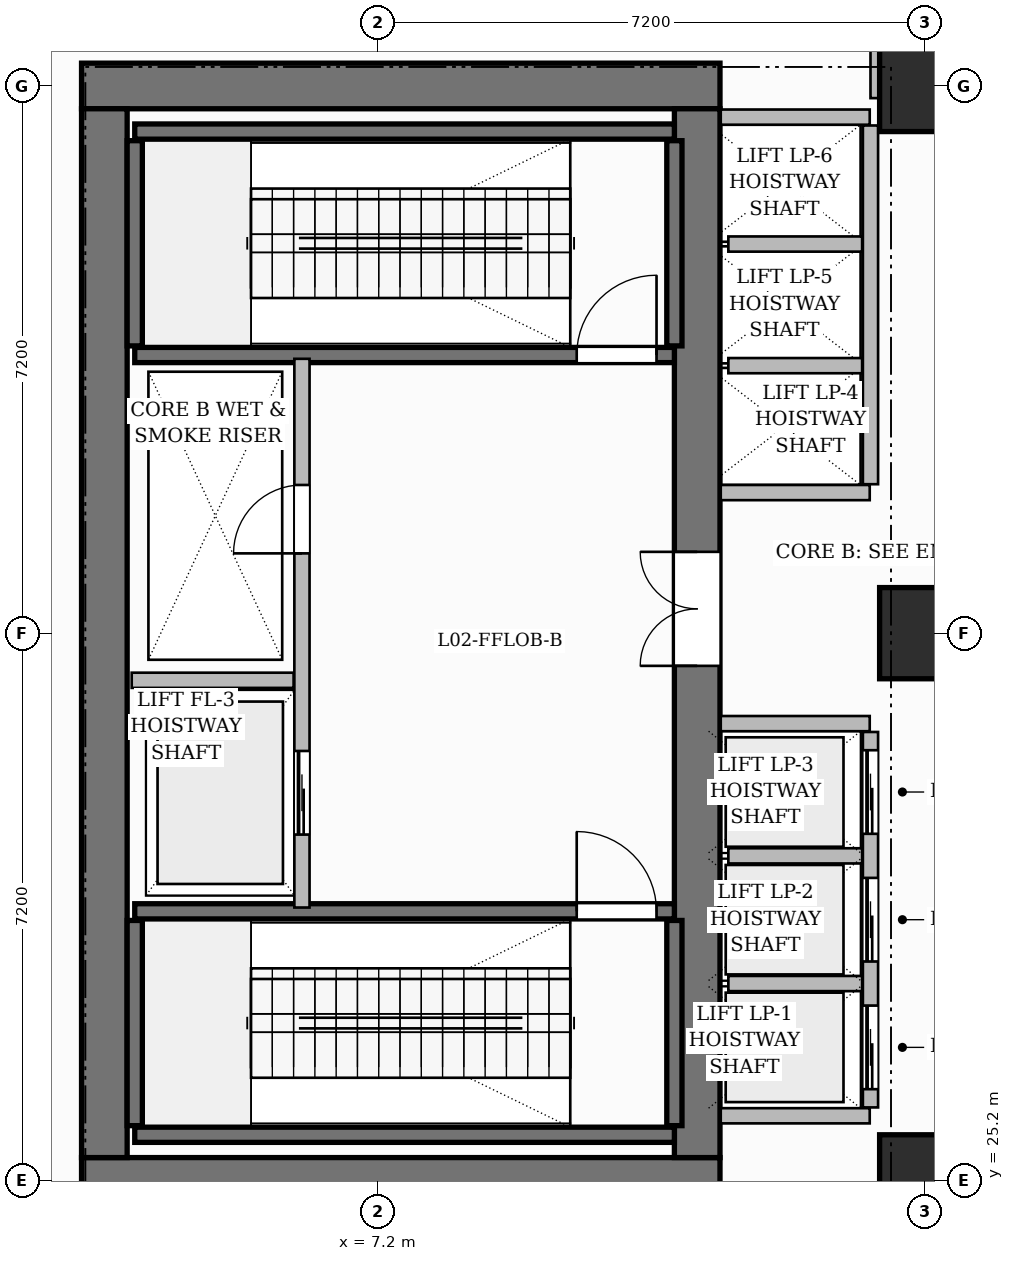
"""IFC4 building model, lengths in metres.
Left out: names, types, materials, properties, quantities, classifications, styles, units other than length and angle.
Written with IfcOpenShell. Run it as: python <this file> out.ifc"""

import sys

from ifc_helpers import new_model, si_unit, direction, frame, frame_2d, origin, origin_2d, place, context, subcontext, project, spatial, rectangle, extrude, source, transform, mapped, element, fill, save


model = new_model("IFC4")
c1 = context("Model", 3, precision=1e-05, world=origin(), true_north=direction((0.0, 1.0)))
c2 = subcontext(c1, "Body", "Model", "MODEL_VIEW")
j1 = project(units=[si_unit("LENGTHUNIT", "METRE"), si_unit("PLANEANGLEUNIT", "RADIAN")], contexts=[c1])
p1 = place(None, origin())
s1 = spatial("IfcSite", under=j1, at=p1, CompositionType="ELEMENT")
p2 = place(p1, origin())
s2 = spatial("IfcBuilding", under=s1, at=p2, CompositionType="ELEMENT")
p3 = place(p2, frame((0.0, 0.0, 10.8)))
s3 = spatial("IfcBuildingStorey", under=s2, at=p3, CompositionType="ELEMENT", Elevation=10.8)
for number, where, z_axis, x_axis in (
    (1, (3.3, 25.2, 0.0), (0.0, 0.0, 1.0), (1.0, 0.0, 0.0)),
    (2, (3.3, 39.6, 0.0), (0.0, 0.0, 1.0), (1.0, 0.0, 0.0)),
):
    element("IfcWall", number, at=place(p3, frame(where, z_axis=z_axis, x_axis=x_axis)), inside=s3, PredefinedType="SHEAR", context=c2, shape_type="SweptSolid", body=[
        extrude(rectangle(XDim=8.4, YDim=0.6, at=frame_2d((4.2, 0.0))), origin(), (0.0, 0.0, 1.0), 5.4),
    ])
p4 = place(p3, frame((3.6, 25.5, 0.0), z_axis=(0.0, 0.0, 1.0), x_axis=(0.0, 1.0, 0.0)))
e3 = element("IfcWall", 3, at=p4, inside=s3, PredefinedType="SHEAR", context=c2, shape_type="SweptSolid", body=[
    extrude(rectangle(XDim=13.8, YDim=0.6, at=frame_2d((6.9, 0.0))), origin(), (0.0, 0.0, 1.0), 5.4),
])
p5 = place(p3, frame((11.4, 25.5, 0.0), z_axis=(0.0, 0.0, 1.0), x_axis=(0.0, 1.0, 0.0)))
e4 = element("IfcWall", 4, at=p5, inside=s3, PredefinedType="SHEAR", context=c2, shape_type="SweptSolid", body=[
    extrude(rectangle(XDim=13.8, YDim=0.6, at=frame_2d((6.9, 0.0))), origin(), (0.0, 0.0, 1.0), 5.4),
])
p6 = place(p5, frame((6.47, 0.0, 0.0)))
e5 = element("IfcOpeningElement", 5, at=p6, cuts=e4, PredefinedType="OPENING", context=c2, shape_type="SweptSolid", body=[
    extrude(rectangle(XDim=1.5, YDim=2.2, at=frame_2d((0.75, 1.1))), frame((0.0, 0.31, 0.0), z_axis=(0.0, -1.0, 0.0), x_axis=(1.0, 0.0, 0.0)), (0.0, 0.0, 1.0), 0.62),
])
m1 = source(origin(), c2, "Body", "SweptSolid", [
    extrude(rectangle(XDim=1.2, YDim=1.2, at=origin_2d()), origin(), (0.0, 0.0, 1.0), 5.4),
])
for number, where, z_axis, x_axis in (
    (6, (14.4, 25.2, 0.0), (0.0, 0.0, 1.0), (1.0, 0.0, 0.0)),
    (7, (14.4, 32.4, 0.0), (0.0, 0.0, 1.0), (1.0, 0.0, 0.0)),
    (8, (14.4, 39.6, 0.0), (0.0, 0.0, 1.0), (1.0, 0.0, 0.0)),
):
    element("IfcColumn", number, at=place(p3, frame(where, z_axis=z_axis, x_axis=x_axis)), inside=s3, PredefinedType="COLUMN", context=c2, shape_type="MappedRepresentation", body=[
        mapped(m1, transform((0.0, 0.0, 0.0), scale=1.0)),
    ])
p7 = place(p3, frame((4.0, 25.8, 0.0), z_axis=(0.0, 0.0, 1.0), x_axis=(1.0, 0.0, 0.0)))
e9 = element("IfcWall", 9, at=p7, inside=s3, PredefinedType="SHEAR", context=c2, shape_type="SweptSolid", body=[
    extrude(rectangle(XDim=7.1, YDim=0.2, at=frame_2d((3.55, 0.0))), origin(), (0.0, 0.0, 1.0), 5.4),
])
for number, where, z_axis, x_axis in (
    (10, (4.0, 25.92, 0.0), (0.0, 0.0, 1.0), (0.0, 1.0, 0.0)),
    (11, (11.1, 25.92, 0.0), (0.0, 0.0, 1.0), (0.0, 1.0, 0.0)),
):
    element("IfcWall", number, at=place(p3, frame(where, z_axis=z_axis, x_axis=x_axis)), inside=s3, PredefinedType="SHEAR", context=c2, shape_type="SweptSolid", body=[
        extrude(rectangle(XDim=2.7, YDim=0.2, at=frame_2d((1.35, 0.0))), origin(), (0.0, 0.0, 1.0), 5.4),
    ])
p8 = place(p3, frame((4.0, 28.74, 0.0), z_axis=(0.0, 0.0, 1.0), x_axis=(1.0, 0.0, 0.0)))
e12 = element("IfcWall", 12, at=p8, inside=s3, PredefinedType="SHEAR", context=c2, shape_type="SweptSolid", body=[
    extrude(rectangle(XDim=7.1, YDim=0.2, at=frame_2d((3.55, 0.0))), origin(), (0.0, 0.0, 1.0), 5.4),
])
p9 = place(p8, frame((5.815, 0.0, 0.0)))
e13 = element("IfcOpeningElement", 13, at=p9, cuts=e12, PredefinedType="OPENING", context=c2, shape_type="SweptSolid", body=[
    extrude(rectangle(XDim=1.05, YDim=2.2, at=frame_2d((0.525, 1.1))), frame((0.0, 0.11, 0.0), z_axis=(0.0, -1.0, 0.0), x_axis=(1.0, 0.0, 0.0)), (0.0, 0.0, 1.0), 0.22),
])
p10 = place(p3, frame((4.0, 39.0, 0.0), z_axis=(0.0, 0.0, 1.0), x_axis=(1.0, 0.0, 0.0)))
e14 = element("IfcWall", 14, at=p10, inside=s3, PredefinedType="SHEAR", context=c2, shape_type="SweptSolid", body=[
    extrude(rectangle(XDim=7.1, YDim=0.2, at=frame_2d((3.55, 0.0))), origin(), (0.0, 0.0, 1.0), 5.4),
])
for number, where, z_axis, x_axis in (
    (15, (4.0, 36.18, 0.0), (0.0, 0.0, 1.0), (0.0, 1.0, 0.0)),
    (16, (11.1, 36.18, 0.0), (0.0, 0.0, 1.0), (0.0, 1.0, 0.0)),
):
    element("IfcWall", number, at=place(p3, frame(where, z_axis=z_axis, x_axis=x_axis)), inside=s3, PredefinedType="SHEAR", context=c2, shape_type="SweptSolid", body=[
        extrude(rectangle(XDim=2.7, YDim=0.2, at=frame_2d((1.35, 0.0))), origin(), (0.0, 0.0, 1.0), 5.4),
    ])
p11 = place(p3, frame((4.0, 36.06, 0.0), z_axis=(0.0, 0.0, 1.0), x_axis=(1.0, 0.0, 0.0)))
e17 = element("IfcWall", 17, at=p11, inside=s3, PredefinedType="SHEAR", context=c2, shape_type="SweptSolid", body=[
    extrude(rectangle(XDim=7.1, YDim=0.2, at=frame_2d((3.55, 0.0))), origin(), (0.0, 0.0, 1.0), 5.4),
])
p12 = place(p11, frame((5.815, 0.0, 0.0)))
e18 = element("IfcOpeningElement", 18, at=p12, cuts=e17, PredefinedType="OPENING", context=c2, shape_type="SweptSolid", body=[
    extrude(rectangle(XDim=1.05, YDim=2.2, at=frame_2d((0.525, 1.1))), frame((0.0, 0.11, 0.0), z_axis=(0.0, -1.0, 0.0), x_axis=(1.0, 0.0, 0.0)), (0.0, 0.0, 1.0), 0.22),
])
p13 = place(p3, frame((6.2, 28.79, 0.0), z_axis=(0.0, 0.0, 1.0), x_axis=(0.0, 1.0, 0.0)))
e19 = element("IfcWall", 19, at=p13, inside=s3, PredefinedType="PARTITIONING", context=c2, shape_type="SweptSolid", body=[
    extrude(rectangle(XDim=7.22, YDim=0.2, at=frame_2d((3.61, 0.0))), origin(), (0.0, 0.0, 1.0), 5.1),
])
p14 = place(p13, frame((4.66, 0.0, 0.0)))
e20 = element("IfcOpeningElement", 20, at=p14, cuts=e19, PredefinedType="OPENING", context=c2, shape_type="SweptSolid", body=[
    extrude(rectangle(XDim=0.9, YDim=2.1, at=frame_2d((0.45, 1.05))), frame((0.0, 0.11, 0.0), z_axis=(0.0, -1.0, 0.0), x_axis=(1.0, 0.0, 0.0)), (0.0, 0.0, 1.0), 0.22),
])
p15 = place(p13, frame((0.96, 0.0, 0.0)))
e21 = element("IfcOpeningElement", 21, at=p15, cuts=e19, PredefinedType="OPENING", context=c2, shape_type="SweptSolid", body=[
    extrude(rectangle(XDim=1.1, YDim=2.2, at=frame_2d((0.55, 1.1))), frame((0.0, 0.11, 0.0), z_axis=(0.0, -1.0, 0.0), x_axis=(1.0, 0.0, 0.0)), (0.0, 0.0, 1.0), 0.22),
])
p16 = place(p3, frame((3.96, 31.78, 0.0), z_axis=(0.0, 0.0, 1.0), x_axis=(1.0, 0.0, 0.0)))
e22 = element("IfcWall", 22, at=p16, inside=s3, PredefinedType="PARTITIONING", context=c2, shape_type="SweptSolid", body=[
    extrude(rectangle(XDim=2.13, YDim=0.2, at=frame_2d((1.065, 0.0))), origin(), (0.0, 0.0, 1.0), 5.1),
])
for number, where, z_axis, x_axis in (
    (23, (11.71, 26.05, 0.0), (0.0, 0.0, 1.0), (1.0, 0.0, 0.0)),
    (24, (11.71, 31.21, 0.0), (0.0, 0.0, 1.0), (1.0, 0.0, 0.0)),
):
    element("IfcWall", number, at=place(p3, frame(where, z_axis=z_axis, x_axis=x_axis)), inside=s3, PredefinedType="PARTITIONING", context=c2, shape_type="SweptSolid", body=[
        extrude(rectangle(XDim=1.96, YDim=0.2, at=frame_2d((0.98, 0.0))), origin(), (0.0, 0.0, 1.0), 5.1),
    ])
p17 = place(p3, frame((13.68, 26.16, 0.0), z_axis=(0.0, 0.0, 1.0), x_axis=(0.0, 1.0, 0.0)))
e25 = element("IfcWall", 25, at=p17, inside=s3, PredefinedType="PARTITIONING", context=c2, shape_type="SweptSolid", body=[
    extrude(rectangle(XDim=4.94, YDim=0.2, at=frame_2d((2.47, 0.0))), origin(), (0.0, 0.0, 1.0), 5.1),
])
p18 = place(p17, frame((0.24, 0.0, 0.0)))
e26 = element("IfcOpeningElement", 26, at=p18, cuts=e25, PredefinedType="OPENING", context=c2, shape_type="SweptSolid", body=[
    extrude(rectangle(XDim=1.1, YDim=2.2, at=frame_2d((0.55, 1.1))), frame((0.0, 0.11, 0.0), z_axis=(0.0, -1.0, 0.0), x_axis=(1.0, 0.0, 0.0)), (0.0, 0.0, 1.0), 0.22),
])
p19 = place(p17, frame((1.92, 0.0, 0.0)))
e27 = element("IfcOpeningElement", 27, at=p19, cuts=e25, PredefinedType="OPENING", context=c2, shape_type="SweptSolid", body=[
    extrude(rectangle(XDim=1.1, YDim=2.2, at=frame_2d((0.55, 1.1))), frame((0.0, 0.11, 0.0), z_axis=(0.0, -1.0, 0.0), x_axis=(1.0, 0.0, 0.0)), (0.0, 0.0, 1.0), 0.22),
])
p20 = place(p17, frame((3.6, 0.0, 0.0)))
e28 = element("IfcOpeningElement", 28, at=p20, cuts=e25, PredefinedType="OPENING", context=c2, shape_type="SweptSolid", body=[
    extrude(rectangle(XDim=1.1, YDim=2.2, at=frame_2d((0.55, 1.1))), frame((0.0, 0.11, 0.0), z_axis=(0.0, -1.0, 0.0), x_axis=(1.0, 0.0, 0.0)), (0.0, 0.0, 1.0), 0.22),
])
for number, where, z_axis, x_axis in (
    (29, (11.81, 27.79, 0.0), (0.0, 0.0, 1.0), (1.0, 0.0, 0.0)),
    (30, (11.81, 29.47, 0.0), (0.0, 0.0, 1.0), (1.0, 0.0, 0.0)),
):
    element("IfcWall", number, at=place(p3, frame(where, z_axis=z_axis, x_axis=x_axis)), inside=s3, PredefinedType="PARTITIONING", context=c2, shape_type="SweptSolid", body=[
        extrude(rectangle(XDim=1.76, YDim=0.2, at=frame_2d((0.88, 0.0))), origin(), (0.0, 0.0, 1.0), 5.1),
    ])
for number, where, z_axis, x_axis in (
    (31, (11.71, 34.25, 0.0), (0.0, 0.0, 1.0), (1.0, 0.0, 0.0)),
    (32, (11.71, 39.19, 0.0), (0.0, 0.0, 1.0), (1.0, 0.0, 0.0)),
):
    element("IfcWall", number, at=place(p3, frame(where, z_axis=z_axis, x_axis=x_axis)), inside=s3, PredefinedType="PARTITIONING", context=c2, shape_type="SweptSolid", body=[
        extrude(rectangle(XDim=1.96, YDim=0.2, at=frame_2d((0.98, 0.0))), origin(), (0.0, 0.0, 1.0), 5.1),
    ])
p21 = place(p3, frame((13.68, 34.36, 0.0), z_axis=(0.0, 0.0, 1.0), x_axis=(0.0, 1.0, 0.0)))
e33 = element("IfcWall", 33, at=p21, inside=s3, PredefinedType="PARTITIONING", context=c2, shape_type="SweptSolid", body=[
    extrude(rectangle(XDim=4.72, YDim=0.2, at=frame_2d((2.36, 0.0))), origin(), (0.0, 0.0, 1.0), 5.1),
])
for number, where, z_axis, x_axis in (
    (34, (11.81, 35.92, 0.0), (0.0, 0.0, 1.0), (1.0, 0.0, 0.0)),
    (35, (11.81, 37.52, 0.0), (0.0, 0.0, 1.0), (1.0, 0.0, 0.0)),
):
    element("IfcWall", number, at=place(p3, frame(where, z_axis=z_axis, x_axis=x_axis)), inside=s3, PredefinedType="PARTITIONING", context=c2, shape_type="SweptSolid", body=[
        extrude(rectangle(XDim=1.76, YDim=0.2, at=frame_2d((0.88, 0.0))), origin(), (0.0, 0.0, 1.0), 5.1),
    ])
p22 = place(p3, frame((13.75, 39.44, 0.0), z_axis=(0.0, 0.0, 1.0), x_axis=(0.0, 1.0, 0.0)))
e36 = element("IfcWall", 36, at=p22, inside=s3, PredefinedType="PARTITIONING", context=c2, shape_type="SweptSolid", body=[
    extrude(rectangle(XDim=7.192, YDim=0.14, at=frame_2d((3.596, 0.0))), origin(), (0.0, 0.0, 1.0), 5.1),
])
p23 = place(p3, frame((13.84, 39.35, 0.0), z_axis=(0.0, 0.0, 1.0), x_axis=(1.0, 0.0, 0.0)))
e37 = element("IfcWall", 37, at=p23, inside=s3, PredefinedType="PARTITIONING", context=c2, shape_type="SweptSolid", body=[
    extrude(rectangle(XDim=7.92, YDim=0.16, at=frame_2d((3.96, 0.0))), origin(), (0.0, 0.0, 1.0), 4.185),
])
p24 = place(p23, frame((1.22, 0.0, 0.0)))
e38 = element("IfcOpeningElement", 38, at=p24, cuts=e37, PredefinedType="OPENING", context=c2, shape_type="SweptSolid", body=[
    extrude(rectangle(XDim=1.6, YDim=2.4, at=frame_2d((0.8, 1.2))), frame((0.0, 0.09, 0.0), z_axis=(0.0, -1.0, 0.0), x_axis=(1.0, 0.0, 0.0)), (0.0, 0.0, 1.0), 0.18),
])
m2 = source(origin(), c2, "Body", "SweptSolid", [
    extrude(rectangle(XDim=1.05, YDim=2.2, at=frame_2d((0.525, 1.1))), frame((0.0, 0.025, 0.0), z_axis=(0.0, -1.0, 0.0), x_axis=(1.0, 0.0, 0.0)), (0.0, 0.0, 1.0), 0.05),
])
p25 = place(p9, origin())
e39 = element("IfcDoor", 39, at=p25, inside=s3, OperationType="SINGLE_SWING_LEFT", PredefinedType="DOOR", context=c2, shape_type="MappedRepresentation", body=[
    mapped(m2, transform((0.0, 0.0, 0.0), scale=1.0)),
])
fill(e13, e39)
p26 = place(p12, origin())
e40 = element("IfcDoor", 40, at=p26, inside=s3, OperationType="SINGLE_SWING_RIGHT", PredefinedType="DOOR", context=c2, shape_type="MappedRepresentation", body=[
    mapped(m2, transform((0.0, 0.0, 0.0), scale=1.0)),
])
fill(e18, e40)
m3 = source(origin(), c2, "Body", "SweptSolid", [
    extrude(rectangle(XDim=0.9, YDim=2.1, at=frame_2d((0.45, 1.05))), frame((0.0, 0.025, 0.0), z_axis=(0.0, -1.0, 0.0), x_axis=(1.0, 0.0, 0.0)), (0.0, 0.0, 1.0), 0.05),
])
p27 = place(p14, origin())
e41 = element("IfcDoor", 41, at=p27, inside=s3, OperationType="SINGLE_SWING_LEFT", PredefinedType="DOOR", context=c2, shape_type="MappedRepresentation", body=[
    mapped(m3, transform((0.0, 0.0, 0.0), scale=1.0)),
])
fill(e20, e41)
m4 = source(origin(), c2, "Body", "SweptSolid", [
    extrude(rectangle(XDim=1.5, YDim=2.2, at=frame_2d((0.75, 1.1))), frame((0.0, 0.025, 0.0), z_axis=(0.0, -1.0, 0.0), x_axis=(1.0, 0.0, 0.0)), (0.0, 0.0, 1.0), 0.05),
])
p28 = place(p6, origin())
e42 = element("IfcDoor", 42, at=p28, inside=s3, OperationType="DOUBLE_DOOR_SINGLE_SWING", PredefinedType="DOOR", context=c2, shape_type="MappedRepresentation", body=[
    mapped(m4, transform((0.0, 0.0, 0.0), scale=1.0)),
])
fill(e5, e42)
m5 = source(origin(), c2, "Body", "SweptSolid", [
    extrude(rectangle(XDim=1.1, YDim=2.2, at=frame_2d((0.55, 1.1))), frame((0.0, 0.025, 0.0), z_axis=(0.0, -1.0, 0.0), x_axis=(1.0, 0.0, 0.0)), (0.0, 0.0, 1.0), 0.05),
])
p29 = place(p15, origin())
e43 = element("IfcDoor", 43, at=p29, inside=s3, OperationType="SLIDING_TO_LEFT", PredefinedType="DOOR", context=c2, shape_type="MappedRepresentation", body=[
    mapped(m5, transform((0.0, 0.0, 0.0), scale=1.0)),
])
fill(e21, e43)
p30 = place(p18, origin())
e44 = element("IfcDoor", 44, at=p30, inside=s3, OperationType="SLIDING_TO_LEFT", PredefinedType="DOOR", context=c2, shape_type="MappedRepresentation", body=[
    mapped(m5, transform((0.0, 0.0, 0.0), scale=1.0)),
])
fill(e26, e44)
p31 = place(p19, origin())
e45 = element("IfcDoor", 45, at=p31, inside=s3, OperationType="SLIDING_TO_LEFT", PredefinedType="DOOR", context=c2, shape_type="MappedRepresentation", body=[
    mapped(m5, transform((0.0, 0.0, 0.0), scale=1.0)),
])
fill(e27, e45)
p32 = place(p20, origin())
e46 = element("IfcDoor", 46, at=p32, inside=s3, OperationType="SLIDING_TO_LEFT", PredefinedType="DOOR", context=c2, shape_type="MappedRepresentation", body=[
    mapped(m5, transform((0.0, 0.0, 0.0), scale=1.0)),
])
fill(e28, e46)
save(model, sys.argv[1])
